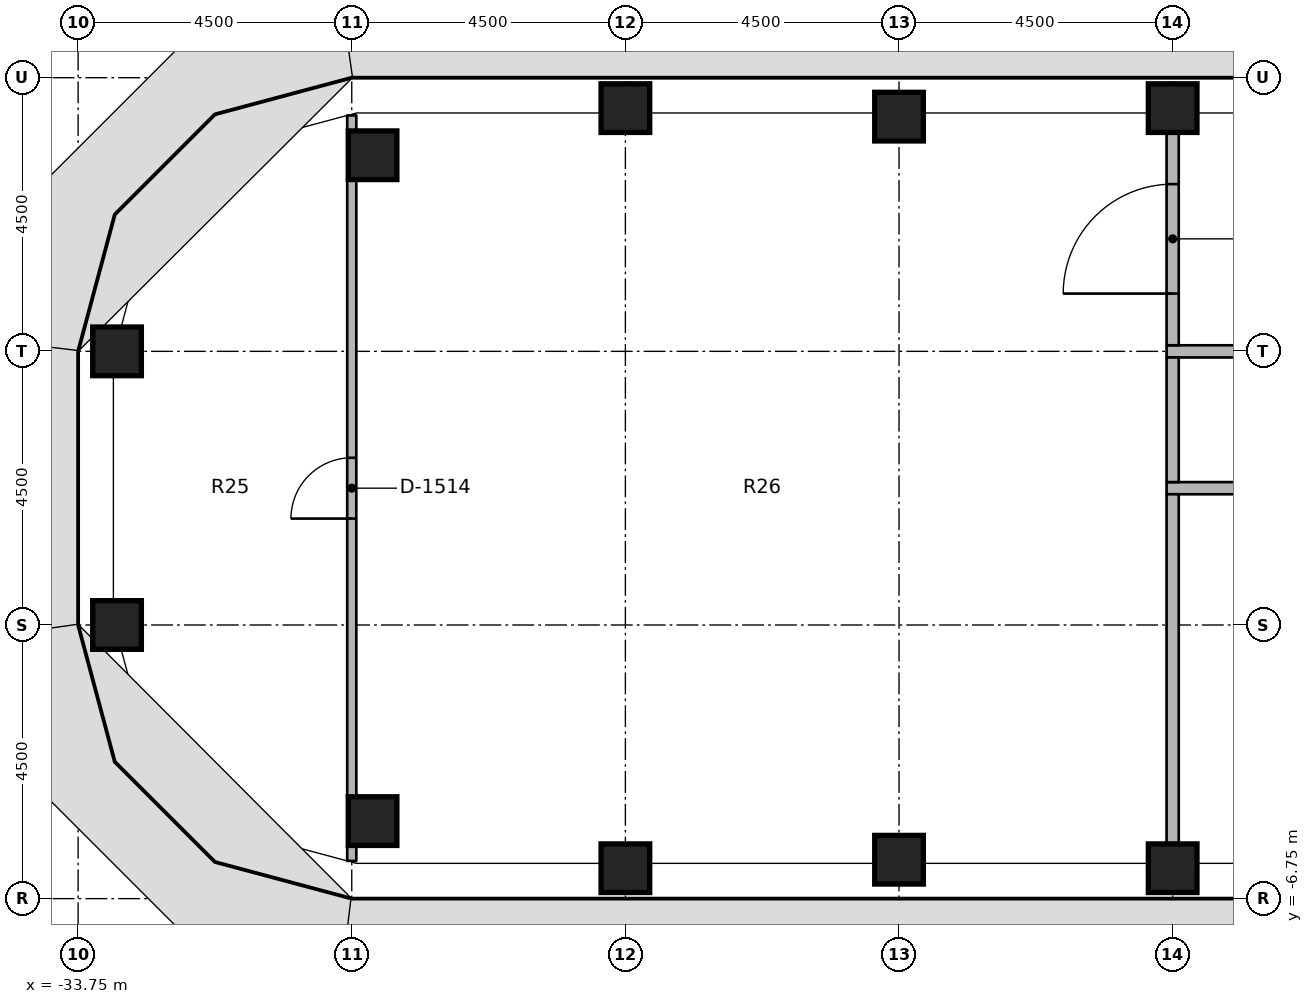
"""IFC4 building model, lengths in metres.
Left out: names, types, materials, properties, quantities, classifications, styles, units other than length and angle.
Written with IfcOpenShell. Run it as: python <this file> out.ifc"""

import sys

from ifc_helpers import new_model, si_unit, direction, frame, frame_2d, origin, origin_2d, place, context, subcontext, project, spatial, rectangle, extrude, element, fill, save


model = new_model("IFC4")
c1 = context("Model", 3, precision=1e-05, world=origin(), true_north=direction((0.0, 1.0)))
c2 = subcontext(c1, "Body", "Model", "MODEL_VIEW")
j1 = project(units=[si_unit("LENGTHUNIT", "METRE"), si_unit("PLANEANGLEUNIT", "RADIAN")], contexts=[c1])
p1 = place(None, origin())
s1 = spatial("IfcSite", under=j1, at=p1, CompositionType="ELEMENT")
p2 = place(p1, origin())
s2 = spatial("IfcBuilding", under=s1, at=p2, CompositionType="ELEMENT")
p3 = place(p2, frame((0.0, 0.0, 144.8)))
s3 = spatial("IfcBuildingStorey", under=s2, at=p3, CompositionType="ELEMENT", Elevation=144.8)
for number, where, z_axis, x_axis in (
    (1, (-33.11, -2.25, 0.0), (0.0, 0.0, 1.0), (1.0, 0.0, 0.0)),
    (2, (-33.11, 2.25, 0.0), (0.0, 0.0, 1.0), (1.0, 0.0, 0.0)),
    (3, (-28.908, -5.475, 0.0), (0.0, 0.0, 1.0), (1.0, 0.0, 0.0)),
    (4, (-28.908, 5.475, 0.0), (0.0, 0.0, 1.0), (1.0, 0.0, 0.0)),
    (5, (-24.75, -6.25, 0.0), (0.0, 0.0, 1.0), (1.0, 0.0, 0.0)),
    (6, (-24.75, 6.25, 0.0), (0.0, 0.0, 1.0), (1.0, 0.0, 0.0)),
    (7, (-20.25, -6.11, 0.0), (0.0, 0.0, 1.0), (1.0, 0.0, 0.0)),
    (8, (-20.25, 6.11, 0.0), (0.0, 0.0, 1.0), (1.0, 0.0, 0.0)),
    (9, (-15.75, -6.25, 0.0), (0.0, 0.0, 1.0), (1.0, 0.0, 0.0)),
    (10, (-15.75, 6.25, 0.0), (0.0, 0.0, 1.0), (1.0, 0.0, 0.0)),
):
    element("IfcColumn", number, at=place(p3, frame(where, z_axis=z_axis, x_axis=x_axis)), inside=s3, PredefinedType="COLUMN", context=c2, shape_type="SweptSolid", body=[
        extrude(rectangle(XDim=0.8, YDim=0.8, at=origin_2d()), origin(), (0.0, 0.0, 1.0), 3.65),
    ])
p4 = place(p3, frame((-15.85, 2.25, 0.0), z_axis=(0.0, 0.0, 1.0), x_axis=(1.0, 0.0, 0.0)))
e11 = element("IfcWall", 11, at=p4, inside=s3, PredefinedType="PARTITIONING", context=c2, shape_type="SweptSolid", body=[
    extrude(rectangle(XDim=4.7, YDim=0.2, at=frame_2d((2.35, 0.0))), origin(), (0.0, 0.0, 1.0), 2.75),
])
p5 = place(p4, frame((1.85, 0.0, 0.0)))
e12 = element("IfcOpeningElement", 12, at=p5, cuts=e11, PredefinedType="OPENING", context=c2, shape_type="SweptSolid", body=[
    extrude(rectangle(XDim=1.0, YDim=2.1, at=frame_2d((0.5, 1.05))), frame((0.0, 0.11, 0.0), z_axis=(0.0, -1.0, 0.0), x_axis=(1.0, 0.0, 0.0)), (0.0, 0.0, 1.0), 0.22),
])
p6 = place(p3, frame((-11.15, 0.0, 0.0), z_axis=(0.0, 0.0, 1.0), x_axis=(-1.0, 0.0, 0.0)))
e13 = element("IfcWall", 13, at=p6, inside=s3, PredefinedType="PARTITIONING", context=c2, shape_type="SweptSolid", body=[
    extrude(rectangle(XDim=4.7, YDim=0.2, at=frame_2d((2.35, 0.0))), origin(), (0.0, 0.0, 1.0), 2.75),
])
p7 = place(p6, frame((1.85, 0.0, 0.0)))
e14 = element("IfcOpeningElement", 14, at=p7, cuts=e13, PredefinedType="OPENING", context=c2, shape_type="SweptSolid", body=[
    extrude(rectangle(XDim=1.0, YDim=2.1, at=frame_2d((0.5, 1.05))), frame((0.0, 0.11, 0.0), z_axis=(0.0, -1.0, 0.0), x_axis=(1.0, 0.0, 0.0)), (0.0, 0.0, 1.0), 0.22),
])
p8 = place(p3, frame((-15.75, 0.1, 0.0), z_axis=(0.0, 0.0, 1.0), x_axis=(0.0, 1.0, 0.0)))
e15 = element("IfcWall", 15, at=p8, inside=s3, PredefinedType="PARTITIONING", context=c2, shape_type="SweptSolid", body=[
    extrude(rectangle(XDim=2.05, YDim=0.2, at=frame_2d((1.025, 0.0))), origin(), (0.0, 0.0, 1.0), 2.75),
])
p9 = place(p3, frame((-15.75, 2.35, 0.0), z_axis=(0.0, 0.0, 1.0), x_axis=(0.0, 1.0, 0.0)))
e16 = element("IfcWall", 16, at=p9, inside=s3, PredefinedType="PARTITIONING", context=c2, shape_type="SweptSolid", body=[
    extrude(rectangle(XDim=3.5, YDim=0.2, at=frame_2d((1.75, 0.0))), origin(), (0.0, 0.0, 1.0), 2.75),
])
p10 = place(p9, frame((0.85, 0.0, 0.0)))
e17 = element("IfcOpeningElement", 17, at=p10, cuts=e16, PredefinedType="OPENING", context=c2, shape_type="SweptSolid", body=[
    extrude(rectangle(XDim=1.8, YDim=2.1, at=frame_2d((0.9, 1.05))), frame((0.0, 0.11, 0.0), z_axis=(0.0, -1.0, 0.0), x_axis=(1.0, 0.0, 0.0)), (0.0, 0.0, 1.0), 0.22),
])
p11 = place(p3, frame((-15.75, -5.85, 0.0), z_axis=(0.0, 0.0, 1.0), x_axis=(0.0, 1.0, 0.0)))
e18 = element("IfcWall", 18, at=p11, inside=s3, PredefinedType="PARTITIONING", context=c2, shape_type="SweptSolid", body=[
    extrude(rectangle(XDim=5.75, YDim=0.2, at=frame_2d((2.875, 0.0))), origin(), (0.0, 0.0, 1.0), 2.75),
])
p12 = place(p3, frame((-29.25, -6.13, 0.0), z_axis=(0.0, 0.0, 1.0), x_axis=(0.0, 1.0, 0.0)))
e19 = element("IfcWall", 19, at=p12, inside=s3, PredefinedType="PARTITIONING", context=c2, shape_type="SweptSolid", body=[
    extrude(rectangle(XDim=0.255, YDim=0.15, at=frame_2d((0.127, 0.0))), origin(), (0.0, 0.0, 1.0), 2.75),
])
p13 = place(p3, frame((-29.25, -5.075, 0.0), z_axis=(0.0, 0.0, 1.0), x_axis=(0.0, 1.0, 0.0)))
e20 = element("IfcWall", 20, at=p13, inside=s3, PredefinedType="PARTITIONING", context=c2, shape_type="SweptSolid", body=[
    extrude(rectangle(XDim=10.15, YDim=0.15, at=frame_2d((5.075, 0.0))), origin(), (0.0, 0.0, 1.0), 2.75),
])
p14 = place(p13, frame((4.575, 0.0, 0.0)))
e21 = element("IfcOpeningElement", 21, at=p14, cuts=e20, PredefinedType="OPENING", context=c2, shape_type="SweptSolid", body=[
    extrude(rectangle(XDim=1.0, YDim=2.1, at=frame_2d((0.5, 1.05))), frame((0.0, 0.085, 0.0), z_axis=(0.0, -1.0, 0.0), x_axis=(1.0, 0.0, 0.0)), (0.0, 0.0, 1.0), 0.17),
])
p15 = place(p3, frame((-29.25, 5.875, 0.0), z_axis=(0.0, 0.0, 1.0), x_axis=(0.0, 1.0, 0.0)))
e22 = element("IfcWall", 22, at=p15, inside=s3, PredefinedType="PARTITIONING", context=c2, shape_type="SweptSolid", body=[
    extrude(rectangle(XDim=0.255, YDim=0.15, at=frame_2d((0.127, 0.0))), origin(), (0.0, 0.0, 1.0), 2.75),
])
p16 = place(p14, origin())
e23 = element("IfcDoor", 23, at=p16, inside=s3, OperationType="SINGLE_SWING_RIGHT", PredefinedType="DOOR", context=c2, shape_type="SweptSolid", body=[
    extrude(rectangle(XDim=1.0, YDim=2.1, at=frame_2d((0.5, 1.05))), frame((0.0, 0.025, 0.0), z_axis=(0.0, -1.0, 0.0), x_axis=(1.0, 0.0, 0.0)), (0.0, 0.0, 1.0), 0.05),
])
fill(e21, e23)
p17 = place(p10, origin())
e24 = element("IfcDoor", 24, at=p17, inside=s3, OperationType="DOUBLE_DOOR_SINGLE_SWING", PredefinedType="DOOR", context=c2, shape_type="SweptSolid", body=[
    extrude(rectangle(XDim=1.8, YDim=2.1, at=frame_2d((0.9, 1.05))), frame((0.0, 0.025, 0.0), z_axis=(0.0, -1.0, 0.0), x_axis=(1.0, 0.0, 0.0)), (0.0, 0.0, 1.0), 0.05),
])
fill(e17, e24)
save(model, sys.argv[1])
